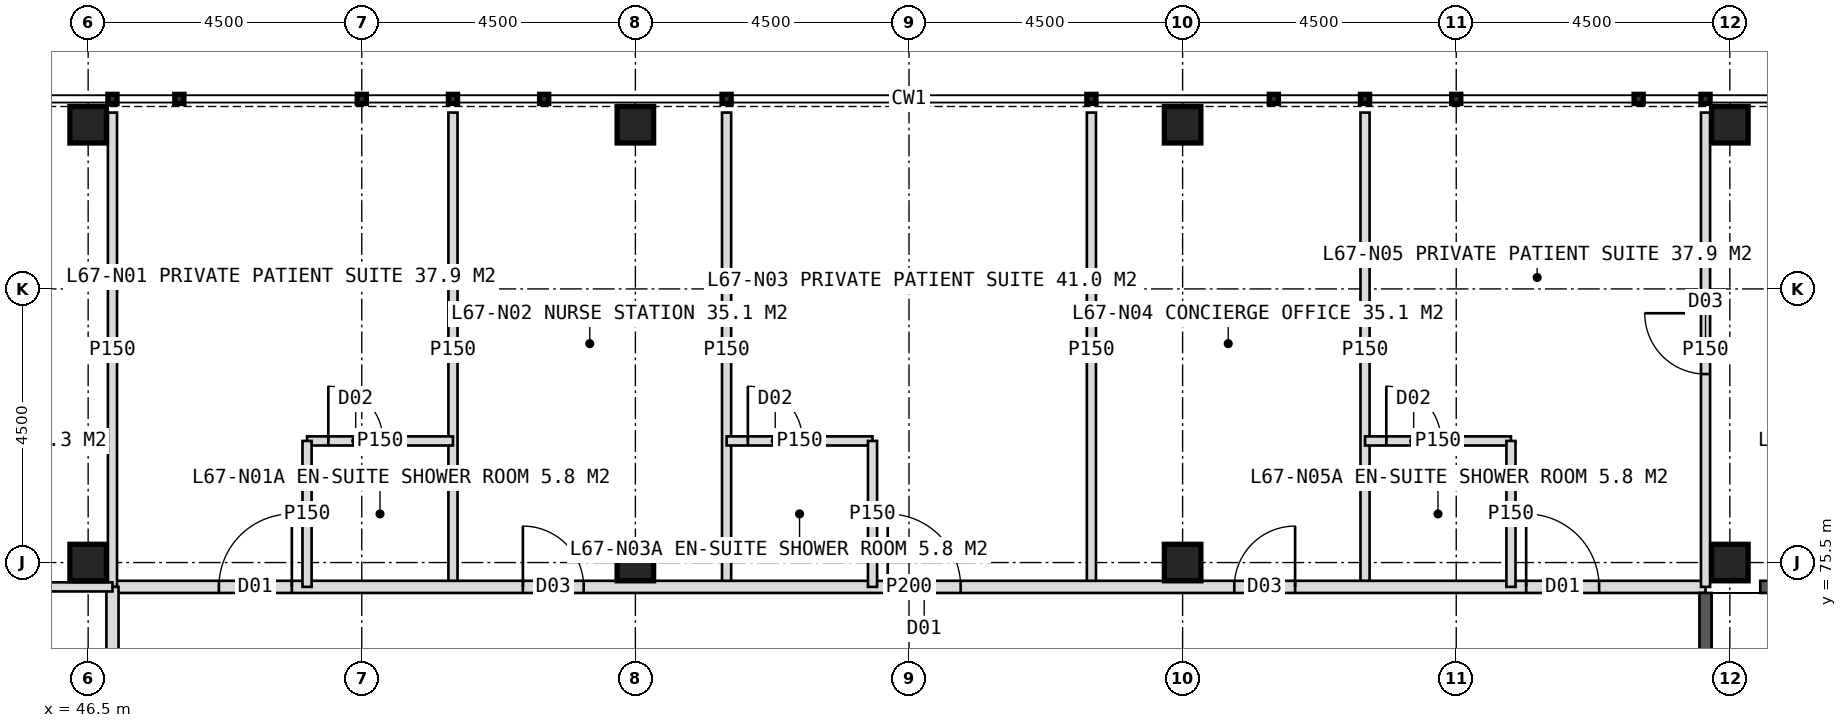
"""IFC4 building model, lengths in metres.
Left out: names, types, materials, properties, quantities, classifications, styles, units other than length and angle.
Written with IfcOpenShell. Run it as: python <this file> out.ifc"""

import sys

from ifc_helpers import new_model, si_unit, direction, frame, frame_2d, origin, origin_2d, place, context, subcontext, project, spatial, rectangle, hollow_rectangle, extrude, element, fill, save


model = new_model("IFC4")
c1 = context("Model", 3, precision=1e-05, world=origin(), true_north=direction((0.0, 1.0)))
c2 = subcontext(c1, "Body", "Model", "MODEL_VIEW")
j1 = project(units=[si_unit("LENGTHUNIT", "METRE"), si_unit("PLANEANGLEUNIT", "RADIAN")], contexts=[c1])
p1 = place(None, origin())
s1 = spatial("IfcSite", under=j1, at=p1, CompositionType="ELEMENT")
p2 = place(p1, origin())
s2 = spatial("IfcBuilding", under=s1, at=p2, CompositionType="ELEMENT")
p3 = place(p2, frame((0.0, 0.0, 278.0)))
s3 = spatial("IfcBuildingStorey", under=s2, at=p3, CompositionType="ELEMENT", Elevation=278.0)
for number, where, z_axis, x_axis in (
    (1, (73.5, 75.5, 0.0), (0.0, 0.0, 1.0), (1.0, 0.0, 0.0)),
    (2, (46.5, 75.5, 0.0), (0.0, 0.0, 1.0), (1.0, 0.0, 0.0)),
    (3, (55.5, 75.5, 0.0), (0.0, 0.0, 1.0), (1.0, 0.0, 0.0)),
    (4, (64.5, 75.5, 0.0), (0.0, 0.0, 1.0), (1.0, 0.0, 0.0)),
    (5, (46.5, 82.7, 0.0), (0.0, 0.0, 1.0), (1.0, 0.0, 0.0)),
    (6, (55.5, 82.7, 0.0), (0.0, 0.0, 1.0), (1.0, 0.0, 0.0)),
    (7, (64.5, 82.7, 0.0), (0.0, 0.0, 1.0), (1.0, 0.0, 0.0)),
    (8, (73.5, 82.7, 0.0), (0.0, 0.0, 1.0), (1.0, 0.0, 0.0)),
):
    element("IfcColumn", number, at=place(p3, frame(where, z_axis=z_axis, x_axis=x_axis)), inside=s3, PredefinedType="COLUMN", context=c2, shape_type="SweptSolid", body=[
        extrude(hollow_rectangle(XDim=0.6, YDim=0.6, WallThickness=0.04, at=origin_2d()), origin(), (0.0, 0.0, 1.0), 4.0),
    ])
for number, where, z_axis, x_axis in (
    (9, (52.5, 75.1, 0.0), (0.0, 0.0, 1.0), (0.0, 1.0, 0.0)),
    (10, (57.0, 75.1, 0.0), (0.0, 0.0, 1.0), (0.0, 1.0, 0.0)),
    (11, (63.0, 75.1, 0.0), (0.0, 0.0, 1.0), (0.0, 1.0, 0.0)),
    (12, (67.5, 75.1, 0.0), (0.0, 0.0, 1.0), (0.0, 1.0, 0.0)),
):
    element("IfcWall", number, at=place(p3, frame(where, z_axis=z_axis, x_axis=x_axis)), inside=s3, PredefinedType="PARTITIONING", context=c2, shape_type="SweptSolid", body=[
        extrude(rectangle(XDim=7.8, YDim=0.15, at=frame_2d((3.9, 0.0))), origin(), (0.0, 0.0, 1.0), 3.75),
    ])
p4 = place(p3, frame((46.9, 75.1, 0.0), z_axis=(0.0, 0.0, 1.0), x_axis=(1.0, 0.0, 0.0)))
e13 = element("IfcWall", 13, at=p4, inside=s3, PredefinedType="PARTITIONING", context=c2, shape_type="SweptSolid", body=[
    extrude(rectangle(XDim=26.2, YDim=0.2, at=frame_2d((13.1, 0.0))), origin(), (0.0, 0.0, 1.0), 3.75),
])
p5 = place(p4, frame((1.75, 0.0, 0.0)))
e14 = element("IfcOpeningElement", 14, at=p5, cuts=e13, PredefinedType="OPENING", context=c2, shape_type="SweptSolid", body=[
    extrude(rectangle(XDim=1.2, YDim=2.2, at=frame_2d((0.6, 1.1))), frame((0.0, 0.11, 0.0), z_axis=(0.0, -1.0, 0.0), x_axis=(1.0, 0.0, 0.0)), (0.0, 0.0, 1.0), 0.22),
])
p6 = place(p4, frame((6.75, 0.0, 0.0)))
e15 = element("IfcOpeningElement", 15, at=p6, cuts=e13, PredefinedType="OPENING", context=c2, shape_type="SweptSolid", body=[
    extrude(rectangle(XDim=1.0, YDim=2.1, at=frame_2d((0.5, 1.05))), frame((0.0, 0.11, 0.0), z_axis=(0.0, -1.0, 0.0), x_axis=(1.0, 0.0, 0.0)), (0.0, 0.0, 1.0), 0.22),
])
p7 = place(p4, frame((12.75, 0.0, 0.0)))
e16 = element("IfcOpeningElement", 16, at=p7, cuts=e13, PredefinedType="OPENING", context=c2, shape_type="SweptSolid", body=[
    extrude(rectangle(XDim=1.2, YDim=2.2, at=frame_2d((0.6, 1.1))), frame((0.0, 0.11, 0.0), z_axis=(0.0, -1.0, 0.0), x_axis=(1.0, 0.0, 0.0)), (0.0, 0.0, 1.0), 0.22),
])
p8 = place(p4, frame((18.45, 0.0, 0.0)))
e17 = element("IfcOpeningElement", 17, at=p8, cuts=e13, PredefinedType="OPENING", context=c2, shape_type="SweptSolid", body=[
    extrude(rectangle(XDim=1.0, YDim=2.1, at=frame_2d((0.5, 1.05))), frame((0.0, 0.11, 0.0), z_axis=(0.0, -1.0, 0.0), x_axis=(1.0, 0.0, 0.0)), (0.0, 0.0, 1.0), 0.22),
])
p9 = place(p4, frame((23.25, 0.0, 0.0)))
e18 = element("IfcOpeningElement", 18, at=p9, cuts=e13, PredefinedType="OPENING", context=c2, shape_type="SweptSolid", body=[
    extrude(rectangle(XDim=1.2, YDim=2.2, at=frame_2d((0.6, 1.1))), frame((0.0, 0.11, 0.0), z_axis=(0.0, -1.0, 0.0), x_axis=(1.0, 0.0, 0.0)), (0.0, 0.0, 1.0), 0.22),
])
p10 = place(p3, frame((46.9, 75.1, 0.0), z_axis=(0.0, 0.0, 1.0), x_axis=(0.0, 1.0, 0.0)))
e19 = element("IfcWall", 19, at=p10, inside=s3, PredefinedType="PARTITIONING", context=c2, shape_type="SweptSolid", body=[
    extrude(rectangle(XDim=7.8, YDim=0.15, at=frame_2d((3.9, 0.0))), origin(), (0.0, 0.0, 1.0), 3.75),
])
p11 = place(p3, frame((50.1, 77.5, 0.0), z_axis=(0.0, 0.0, 1.0), x_axis=(1.0, 0.0, 0.0)))
e20 = element("IfcWall", 20, at=p11, inside=s3, PredefinedType="PARTITIONING", context=c2, shape_type="SweptSolid", body=[
    extrude(rectangle(XDim=2.4, YDim=0.15, at=frame_2d((1.2, 0.0))), origin(), (0.0, 0.0, 1.0), 3.75),
])
p12 = place(p11, frame((0.35, 0.0, 0.0)))
e21 = element("IfcOpeningElement", 21, at=p12, cuts=e20, PredefinedType="OPENING", context=c2, shape_type="SweptSolid", body=[
    extrude(rectangle(XDim=0.9, YDim=2.1, at=frame_2d((0.45, 1.05))), frame((0.0, 0.085, 0.0), z_axis=(0.0, -1.0, 0.0), x_axis=(1.0, 0.0, 0.0)), (0.0, 0.0, 1.0), 0.17),
])
p13 = place(p3, frame((50.1, 75.1, 0.0), z_axis=(0.0, 0.0, 1.0), x_axis=(0.0, 1.0, 0.0)))
e22 = element("IfcWall", 22, at=p13, inside=s3, PredefinedType="PARTITIONING", context=c2, shape_type="SweptSolid", body=[
    extrude(rectangle(XDim=2.4, YDim=0.15, at=frame_2d((1.2, 0.0))), origin(), (0.0, 0.0, 1.0), 3.75),
])
p14 = place(p3, frame((57.0, 77.5, 0.0), z_axis=(0.0, 0.0, 1.0), x_axis=(1.0, 0.0, 0.0)))
e23 = element("IfcWall", 23, at=p14, inside=s3, PredefinedType="PARTITIONING", context=c2, shape_type="SweptSolid", body=[
    extrude(rectangle(XDim=2.4, YDim=0.15, at=frame_2d((1.2, 0.0))), origin(), (0.0, 0.0, 1.0), 3.75),
])
p15 = place(p14, frame((0.35, 0.0, 0.0)))
e24 = element("IfcOpeningElement", 24, at=p15, cuts=e23, PredefinedType="OPENING", context=c2, shape_type="SweptSolid", body=[
    extrude(rectangle(XDim=0.9, YDim=2.1, at=frame_2d((0.45, 1.05))), frame((0.0, 0.085, 0.0), z_axis=(0.0, -1.0, 0.0), x_axis=(1.0, 0.0, 0.0)), (0.0, 0.0, 1.0), 0.17),
])
p16 = place(p3, frame((59.4, 75.1, 0.0), z_axis=(0.0, 0.0, 1.0), x_axis=(0.0, 1.0, 0.0)))
e25 = element("IfcWall", 25, at=p16, inside=s3, PredefinedType="PARTITIONING", context=c2, shape_type="SweptSolid", body=[
    extrude(rectangle(XDim=2.4, YDim=0.15, at=frame_2d((1.2, 0.0))), origin(), (0.0, 0.0, 1.0), 3.75),
])
p17 = place(p3, frame((73.1, 75.1, 0.0), z_axis=(0.0, 0.0, 1.0), x_axis=(0.0, 1.0, 0.0)))
e26 = element("IfcWall", 26, at=p17, inside=s3, PredefinedType="PARTITIONING", context=c2, shape_type="SweptSolid", body=[
    extrude(rectangle(XDim=7.8, YDim=0.15, at=frame_2d((3.9, 0.0))), origin(), (0.0, 0.0, 1.0), 3.75),
])
p18 = place(p17, frame((3.5, 0.0, 0.0)))
e27 = element("IfcOpeningElement", 27, at=p18, cuts=e26, PredefinedType="OPENING", context=c2, shape_type="SweptSolid", body=[
    extrude(rectangle(XDim=1.0, YDim=2.1, at=frame_2d((0.5, 1.05))), frame((0.0, 0.085, 0.0), z_axis=(0.0, -1.0, 0.0), x_axis=(1.0, 0.0, 0.0)), (0.0, 0.0, 1.0), 0.17),
])
p19 = place(p3, frame((67.5, 77.5, 0.0), z_axis=(0.0, 0.0, 1.0), x_axis=(1.0, 0.0, 0.0)))
e28 = element("IfcWall", 28, at=p19, inside=s3, PredefinedType="PARTITIONING", context=c2, shape_type="SweptSolid", body=[
    extrude(rectangle(XDim=2.4, YDim=0.15, at=frame_2d((1.2, 0.0))), origin(), (0.0, 0.0, 1.0), 3.75),
])
p20 = place(p19, frame((0.35, 0.0, 0.0)))
e29 = element("IfcOpeningElement", 29, at=p20, cuts=e28, PredefinedType="OPENING", context=c2, shape_type="SweptSolid", body=[
    extrude(rectangle(XDim=0.9, YDim=2.1, at=frame_2d((0.45, 1.05))), frame((0.0, 0.085, 0.0), z_axis=(0.0, -1.0, 0.0), x_axis=(1.0, 0.0, 0.0)), (0.0, 0.0, 1.0), 0.17),
])
p21 = place(p3, frame((69.9, 75.1, 0.0), z_axis=(0.0, 0.0, 1.0), x_axis=(0.0, 1.0, 0.0)))
e30 = element("IfcWall", 30, at=p21, inside=s3, PredefinedType="PARTITIONING", context=c2, shape_type="SweptSolid", body=[
    extrude(rectangle(XDim=2.4, YDim=0.15, at=frame_2d((1.2, 0.0))), origin(), (0.0, 0.0, 1.0), 3.75),
])
p22 = place(p3, frame((46.9, 48.9, 0.0), z_axis=(0.0, 0.0, 1.0), x_axis=(0.0, 1.0, 0.0)))
e31 = element("IfcWall", 31, at=p22, inside=s3, PredefinedType="PARTITIONING", context=c2, shape_type="SweptSolid", body=[
    extrude(rectangle(XDim=26.2, YDim=0.2, at=frame_2d((13.1, 0.0))), origin(), (0.0, 0.0, 1.0), 3.75),
])
p23 = place(p22, frame((1.75, 0.0, 0.0)))
e32 = element("IfcOpeningElement", 32, at=p23, cuts=e31, PredefinedType="OPENING", context=c2, shape_type="SweptSolid", body=[
    extrude(rectangle(XDim=1.2, YDim=2.2, at=frame_2d((0.6, 1.1))), frame((0.0, 0.11, 0.0), z_axis=(0.0, -1.0, 0.0), x_axis=(1.0, 0.0, 0.0)), (0.0, 0.0, 1.0), 0.22),
])
p24 = place(p22, frame((6.75, 0.0, 0.0)))
e33 = element("IfcOpeningElement", 33, at=p24, cuts=e31, PredefinedType="OPENING", context=c2, shape_type="SweptSolid", body=[
    extrude(rectangle(XDim=1.0, YDim=2.1, at=frame_2d((0.5, 1.05))), frame((0.0, 0.11, 0.0), z_axis=(0.0, -1.0, 0.0), x_axis=(1.0, 0.0, 0.0)), (0.0, 0.0, 1.0), 0.22),
])
p25 = place(p22, frame((11.1, 0.0, 0.0)))
e34 = element("IfcOpeningElement", 34, at=p25, cuts=e31, PredefinedType="OPENING", context=c2, shape_type="SweptSolid", body=[
    extrude(rectangle(XDim=1.0, YDim=2.1, at=frame_2d((0.5, 1.05))), frame((0.0, 0.11, 0.0), z_axis=(0.0, -1.0, 0.0), x_axis=(1.0, 0.0, 0.0)), (0.0, 0.0, 1.0), 0.22),
])
p26 = place(p22, frame((15.75, 0.0, 0.0)))
e35 = element("IfcOpeningElement", 35, at=p26, cuts=e31, PredefinedType="OPENING", context=c2, shape_type="SweptSolid", body=[
    extrude(rectangle(XDim=1.0, YDim=2.1, at=frame_2d((0.5, 1.05))), frame((0.0, 0.11, 0.0), z_axis=(0.0, -1.0, 0.0), x_axis=(1.0, 0.0, 0.0)), (0.0, 0.0, 1.0), 0.22),
])
p27 = place(p22, frame((23.25, 0.0, 0.0)))
e36 = element("IfcOpeningElement", 36, at=p27, cuts=e31, PredefinedType="OPENING", context=c2, shape_type="SweptSolid", body=[
    extrude(rectangle(XDim=1.2, YDim=2.2, at=frame_2d((0.6, 1.1))), frame((0.0, 0.11, 0.0), z_axis=(0.0, -1.0, 0.0), x_axis=(1.0, 0.0, 0.0)), (0.0, 0.0, 1.0), 0.22),
])
p28 = place(p3, frame((46.9, 75.1, 0.0), z_axis=(0.0, 0.0, 1.0), x_axis=(-1.0, 0.0, 0.0)))
e37 = element("IfcWall", 37, at=p28, inside=s3, PredefinedType="PARTITIONING", context=c2, shape_type="SweptSolid", body=[
    extrude(rectangle(XDim=7.8, YDim=0.15, at=frame_2d((3.9, 0.0))), origin(), (0.0, 0.0, 1.0), 3.75),
])
p29 = place(p28, frame((3.5, 0.0, 0.0)))
e38 = element("IfcOpeningElement", 38, at=p29, cuts=e37, PredefinedType="OPENING", context=c2, shape_type="SweptSolid", body=[
    extrude(rectangle(XDim=1.0, YDim=2.1, at=frame_2d((0.5, 1.05))), frame((0.0, 0.085, 0.0), z_axis=(0.0, -1.0, 0.0), x_axis=(1.0, 0.0, 0.0)), (0.0, 0.0, 1.0), 0.17),
])
p30 = place(p3, frame((73.1, 75.0, 0.0), z_axis=(0.0, 0.0, 1.0), x_axis=(0.0, -1.0, 0.0)))
e39 = element("IfcWall", 39, at=p30, inside=s3, PredefinedType="SOLIDWALL", context=c2, shape_type="SweptSolid", body=[
    extrude(rectangle(XDim=4.0, YDim=0.2, at=frame_2d((2.0, 0.0))), origin(), (0.0, 0.0, 1.0), 3.75),
])
p31 = place(p30, frame((1.5, 0.0, 0.0)))
e40 = element("IfcOpeningElement", 40, at=p31, cuts=e39, PredefinedType="OPENING", context=c2, shape_type="SweptSolid", body=[
    extrude(rectangle(XDim=1.2, YDim=2.1, at=frame_2d((0.6, 1.05))), frame((0.0, 0.11, 0.0), z_axis=(0.0, -1.0, 0.0), x_axis=(1.0, 0.0, 0.0)), (0.0, 0.0, 1.0), 0.22),
])
p32 = place(p3, frame((74.0, 75.1, 0.0), z_axis=(0.0, 0.0, 1.0), x_axis=(1.0, 0.0, 0.0)))
e41 = element("IfcWall", 41, at=p32, inside=s3, PredefinedType="SOLIDWALL", context=c2, shape_type="SweptSolid", body=[
    extrude(rectangle(XDim=6.15, YDim=0.2, at=frame_2d((3.075, 0.0))), origin(), (0.0, 0.0, 1.0), 3.75),
])
p33 = place(p5, origin())
e42 = element("IfcDoor", 42, at=p33, inside=s3, OperationType="SINGLE_SWING_RIGHT", PredefinedType="DOOR", context=c2, shape_type="SweptSolid", body=[
    extrude(rectangle(XDim=1.2, YDim=2.2, at=frame_2d((0.6, 1.1))), frame((0.0, 0.025, 0.0), z_axis=(0.0, -1.0, 0.0), x_axis=(1.0, 0.0, 0.0)), (0.0, 0.0, 1.0), 0.05),
])
fill(e14, e42)
p34 = place(p12, origin())
e43 = element("IfcDoor", 43, at=p34, inside=s3, OperationType="SINGLE_SWING_LEFT", PredefinedType="DOOR", context=c2, shape_type="SweptSolid", body=[
    extrude(rectangle(XDim=0.9, YDim=2.1, at=frame_2d((0.45, 1.05))), frame((0.0, 0.025, 0.0), z_axis=(0.0, -1.0, 0.0), x_axis=(1.0, 0.0, 0.0)), (0.0, 0.0, 1.0), 0.05),
])
fill(e21, e43)
p35 = place(p6, origin())
e44 = element("IfcDoor", 44, at=p35, inside=s3, OperationType="SINGLE_SWING_LEFT", PredefinedType="DOOR", context=c2, shape_type="SweptSolid", body=[
    extrude(rectangle(XDim=1.0, YDim=2.1, at=frame_2d((0.5, 1.05))), frame((0.0, 0.025, 0.0), z_axis=(0.0, -1.0, 0.0), x_axis=(1.0, 0.0, 0.0)), (0.0, 0.0, 1.0), 0.05),
])
fill(e15, e44)
p36 = place(p7, origin())
e45 = element("IfcDoor", 45, at=p36, inside=s3, OperationType="SINGLE_SWING_LEFT", PredefinedType="DOOR", context=c2, shape_type="SweptSolid", body=[
    extrude(rectangle(XDim=1.2, YDim=2.2, at=frame_2d((0.6, 1.1))), frame((0.0, 0.025, 0.0), z_axis=(0.0, -1.0, 0.0), x_axis=(1.0, 0.0, 0.0)), (0.0, 0.0, 1.0), 0.05),
])
fill(e16, e45)
p37 = place(p15, origin())
e46 = element("IfcDoor", 46, at=p37, inside=s3, OperationType="SINGLE_SWING_LEFT", PredefinedType="DOOR", context=c2, shape_type="SweptSolid", body=[
    extrude(rectangle(XDim=0.9, YDim=2.1, at=frame_2d((0.45, 1.05))), frame((0.0, 0.025, 0.0), z_axis=(0.0, -1.0, 0.0), x_axis=(1.0, 0.0, 0.0)), (0.0, 0.0, 1.0), 0.05),
])
fill(e24, e46)
p38 = place(p8, origin())
e47 = element("IfcDoor", 47, at=p38, inside=s3, OperationType="SINGLE_SWING_RIGHT", PredefinedType="DOOR", context=c2, shape_type="SweptSolid", body=[
    extrude(rectangle(XDim=1.0, YDim=2.1, at=frame_2d((0.5, 1.05))), frame((0.0, 0.025, 0.0), z_axis=(0.0, -1.0, 0.0), x_axis=(1.0, 0.0, 0.0)), (0.0, 0.0, 1.0), 0.05),
])
fill(e17, e47)
p39 = place(p18, origin())
e48 = element("IfcDoor", 48, at=p39, inside=s3, OperationType="SINGLE_SWING_RIGHT", PredefinedType="DOOR", context=c2, shape_type="SweptSolid", body=[
    extrude(rectangle(XDim=1.0, YDim=2.1, at=frame_2d((0.5, 1.05))), frame((0.0, 0.025, 0.0), z_axis=(0.0, -1.0, 0.0), x_axis=(1.0, 0.0, 0.0)), (0.0, 0.0, 1.0), 0.05),
])
fill(e27, e48)
p40 = place(p9, origin())
e49 = element("IfcDoor", 49, at=p40, inside=s3, OperationType="SINGLE_SWING_LEFT", PredefinedType="DOOR", context=c2, shape_type="SweptSolid", body=[
    extrude(rectangle(XDim=1.2, YDim=2.2, at=frame_2d((0.6, 1.1))), frame((0.0, 0.025, 0.0), z_axis=(0.0, -1.0, 0.0), x_axis=(1.0, 0.0, 0.0)), (0.0, 0.0, 1.0), 0.05),
])
fill(e18, e49)
p41 = place(p20, origin())
e50 = element("IfcDoor", 50, at=p41, inside=s3, OperationType="SINGLE_SWING_LEFT", PredefinedType="DOOR", context=c2, shape_type="SweptSolid", body=[
    extrude(rectangle(XDim=0.9, YDim=2.1, at=frame_2d((0.45, 1.05))), frame((0.0, 0.025, 0.0), z_axis=(0.0, -1.0, 0.0), x_axis=(1.0, 0.0, 0.0)), (0.0, 0.0, 1.0), 0.05),
])
fill(e29, e50)
save(model, sys.argv[1])
